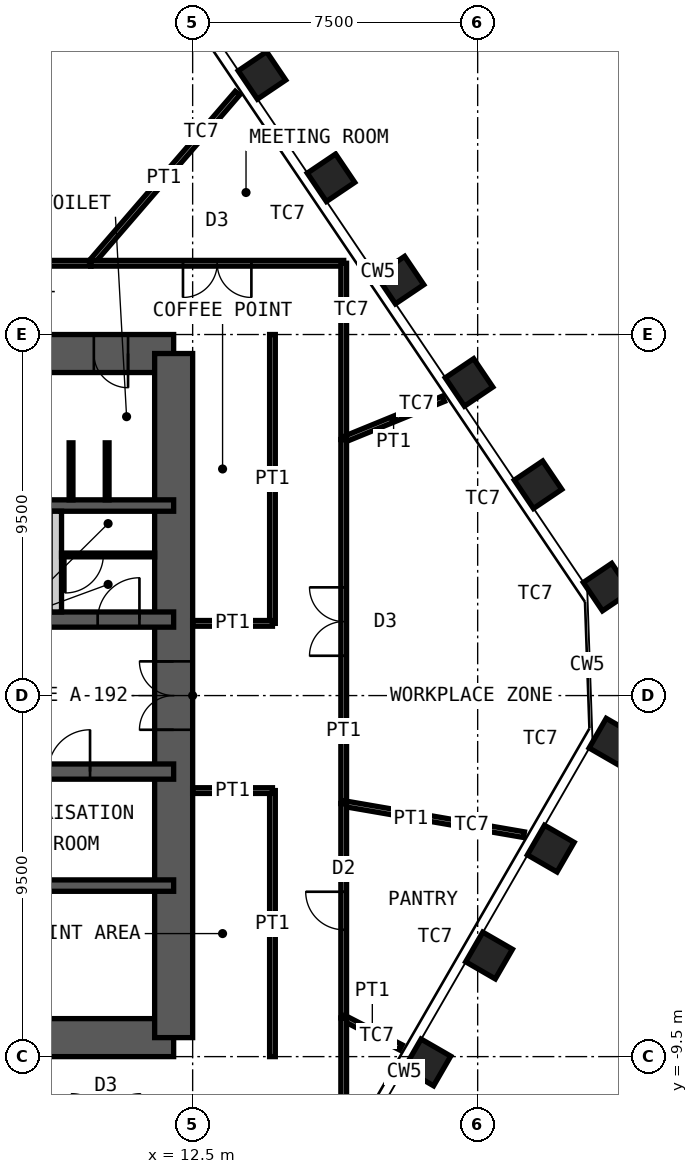
"""IFC4 building model, lengths in metres.
Left out: names, types, materials, properties, quantities, classifications, styles, units other than length and angle.
Written with IfcOpenShell. Run it as: python <this file> out.ifc"""

import sys

from ifc_helpers import new_model, si_unit, direction, frame, frame_2d, origin, origin_2d, place, context, subcontext, project, spatial, rectangle, hollow_rectangle, extrude, element, fill, save


model = new_model("IFC4")
c1 = context("Model", 3, precision=1e-05, world=origin(), true_north=direction((0.0, 1.0)))
c2 = subcontext(c1, "Body", "Model", "MODEL_VIEW")
j1 = project(units=[si_unit("LENGTHUNIT", "METRE"), si_unit("PLANEANGLEUNIT", "RADIAN")], contexts=[c1])
p1 = place(None, origin())
s1 = spatial("IfcSite", under=j1, at=p1, CompositionType="ELEMENT")
p2 = place(p1, origin())
s2 = spatial("IfcBuilding", under=s1, at=p2, CompositionType="ELEMENT")
p3 = place(p2, frame((0.0, 0.0, 274.6)))
s3 = spatial("IfcBuildingStorey", under=s2, at=p3, CompositionType="ELEMENT", Elevation=274.6)
for number, where, z_axis, x_axis in (
    (1, (14.324, 16.318, 0.0), (0.0, 0.0, 1.0), (-0.559, 0.829, 0.0)),
    (2, (16.141, 13.625, 0.0), (0.0, 0.0, 1.0), (-0.559, 0.829, 0.0)),
    (3, (17.957, 10.932, 0.0), (0.0, 0.0, 1.0), (-0.559, 0.829, 0.0)),
    (4, (19.773, 8.239, 0.0), (0.0, 0.0, 1.0), (-0.559, 0.829, 0.0)),
    (5, (21.589, 5.547, 0.0), (0.0, 0.0, 1.0), (-0.559, 0.829, 0.0)),
    (6, (23.406, 2.854, 0.0), (0.0, 0.0, 1.0), (-0.559, 0.829, 0.0)),
    (7, (23.548, -1.214, 0.0), (0.0, 0.0, 1.0), (0.5, 0.866, 0.0)),
    (8, (21.924, -4.027, 0.0), (0.0, 0.0, 1.0), (0.5, 0.866, 0.0)),
    (9, (20.3, -6.84, 0.0), (0.0, 0.0, 1.0), (0.5, 0.866, 0.0)),
    (10, (18.676, -9.653, 0.0), (0.0, 0.0, 1.0), (0.5, 0.866, 0.0)),
):
    element("IfcColumn", number, at=place(p3, frame(where, z_axis=z_axis, x_axis=x_axis)), inside=s3, PredefinedType="COLUMN", context=c2, shape_type="SweptSolid", body=[
        extrude(hollow_rectangle(XDim=0.9, YDim=0.9, WallThickness=0.06, at=origin_2d()), origin(), (0.0, 0.0, 1.0), 4.2),
    ])
p4 = place(p3, frame((-12.0, 9.0, 0.0), z_axis=(0.0, 0.0, 1.0), x_axis=(1.0, 0.0, 0.0)))
e11 = element("IfcWall", 11, at=p4, inside=s3, PredefinedType="SHEAR", context=c2, shape_type="SweptSolid", body=[
    extrude(rectangle(XDim=24.0, YDim=1.0, at=frame_2d((12.0, 0.0))), origin(), (0.0, 0.0, 1.0), 4.2),
])
p5 = place(p4, frame((10.4, 0.0, 0.0)))
e12 = element("IfcOpeningElement", 12, at=p5, cuts=e11, PredefinedType="OPENING", context=c2, shape_type="SweptSolid", body=[
    extrude(rectangle(XDim=1.0, YDim=2.1, at=frame_2d((0.5, 1.05))), frame((0.0, 0.51, 0.0), z_axis=(0.0, -1.0, 0.0), x_axis=(1.0, 0.0, 0.0)), (0.0, 0.0, 1.0), 1.02),
])
p6 = place(p4, frame((17.6, 0.0, 0.0)))
e13 = element("IfcOpeningElement", 13, at=p6, cuts=e11, PredefinedType="OPENING", context=c2, shape_type="SweptSolid", body=[
    extrude(rectangle(XDim=0.9, YDim=2.1, at=frame_2d((0.45, 1.05))), frame((0.0, 0.51, 0.0), z_axis=(0.0, -1.0, 0.0), x_axis=(1.0, 0.0, 0.0)), (0.0, 0.0, 1.0), 1.02),
])
p7 = place(p4, frame((21.9, 0.0, 0.0)))
e14 = element("IfcOpeningElement", 14, at=p7, cuts=e11, PredefinedType="OPENING", context=c2, shape_type="SweptSolid", body=[
    extrude(rectangle(XDim=0.9, YDim=2.1, at=frame_2d((0.45, 1.05))), frame((0.0, 0.51, 0.0), z_axis=(0.0, -1.0, 0.0), x_axis=(1.0, 0.0, 0.0)), (0.0, 0.0, 1.0), 1.02),
])
p8 = place(p3, frame((-12.0, -9.0, 0.0), z_axis=(0.0, 0.0, 1.0), x_axis=(1.0, 0.0, 0.0)))
e15 = element("IfcWall", 15, at=p8, inside=s3, PredefinedType="SHEAR", context=c2, shape_type="SweptSolid", body=[
    extrude(rectangle(XDim=24.0, YDim=1.0, at=frame_2d((12.0, 0.0))), origin(), (0.0, 0.0, 1.0), 4.2),
])
p9 = place(p8, frame((1.35, 0.0, 0.0)))
e16 = element("IfcOpeningElement", 16, at=p9, cuts=e15, PredefinedType="OPENING", context=c2, shape_type="SweptSolid", body=[
    extrude(rectangle(XDim=1.0, YDim=2.1, at=frame_2d((0.5, 1.05))), frame((0.0, 0.51, 0.0), z_axis=(0.0, -1.0, 0.0), x_axis=(1.0, 0.0, 0.0)), (0.0, 0.0, 1.0), 1.02),
])
p10 = place(p8, frame((5.325, 0.0, 0.0)))
e17 = element("IfcOpeningElement", 17, at=p10, cuts=e15, PredefinedType="OPENING", context=c2, shape_type="SweptSolid", body=[
    extrude(rectangle(XDim=1.15, YDim=2.1, at=frame_2d((0.575, 1.05))), frame((0.0, 0.51, 0.0), z_axis=(0.0, -1.0, 0.0), x_axis=(1.0, 0.0, 0.0)), (0.0, 0.0, 1.0), 1.02),
])
p11 = place(p8, frame((12.6, 0.0, 0.0)))
e18 = element("IfcOpeningElement", 18, at=p11, cuts=e15, PredefinedType="OPENING", context=c2, shape_type="SweptSolid", body=[
    extrude(rectangle(XDim=1.0, YDim=2.1, at=frame_2d((0.5, 1.05))), frame((0.0, 0.51, 0.0), z_axis=(0.0, -1.0, 0.0), x_axis=(1.0, 0.0, 0.0)), (0.0, 0.0, 1.0), 1.02),
])
p12 = place(p3, frame((12.0, -9.0, 0.0), z_axis=(0.0, 0.0, 1.0), x_axis=(0.0, 1.0, 0.0)))
e19 = element("IfcWall", 19, at=p12, inside=s3, PredefinedType="SHEAR", context=c2, shape_type="SweptSolid", body=[
    extrude(rectangle(XDim=18.0, YDim=1.0, at=frame_2d((9.0, 0.0))), origin(), (0.0, 0.0, 1.0), 4.2),
])
p13 = place(p12, frame((8.1, 0.0, 0.0)))
e20 = element("IfcOpeningElement", 20, at=p13, cuts=e19, PredefinedType="OPENING", context=c2, shape_type="SweptSolid", body=[
    extrude(rectangle(XDim=1.8, YDim=2.1, at=frame_2d((0.9, 1.05))), frame((0.0, 0.51, 0.0), z_axis=(0.0, -1.0, 0.0), x_axis=(1.0, 0.0, 0.0)), (0.0, 0.0, 1.0), 1.02),
])
p14 = place(p3, frame((-12.0, 5.0, 0.0), z_axis=(0.0, 0.0, 1.0), x_axis=(1.0, 0.0, 0.0)))
e21 = element("IfcWall", 21, at=p14, inside=s3, PredefinedType="SHEAR", context=c2, shape_type="SweptSolid", body=[
    extrude(rectangle(XDim=24.0, YDim=0.3, at=frame_2d((12.0, 0.0))), origin(), (0.0, 0.0, 1.0), 4.2),
])
p15 = place(p3, frame((-12.0, 2.0, 0.0), z_axis=(0.0, 0.0, 1.0), x_axis=(1.0, 0.0, 0.0)))
e22 = element("IfcWall", 22, at=p15, inside=s3, PredefinedType="SHEAR", context=c2, shape_type="SweptSolid", body=[
    extrude(rectangle(XDim=24.0, YDim=0.4, at=frame_2d((12.0, 0.0))), origin(), (0.0, 0.0, 1.0), 4.2),
])
p16 = place(p15, frame((2.4, 0.0, 0.0)))
e23 = element("IfcOpeningElement", 23, at=p16, cuts=e22, PredefinedType="OPENING", context=c2, shape_type="SweptSolid", body=[
    extrude(rectangle(XDim=1.1, YDim=2.1, at=frame_2d((0.55, 1.05))), frame((0.0, 0.21, 0.0), z_axis=(0.0, -1.0, 0.0), x_axis=(1.0, 0.0, 0.0)), (0.0, 0.0, 1.0), 0.42),
])
p17 = place(p15, frame((22.0, 0.0, 0.0)))
e24 = element("IfcOpeningElement", 24, at=p17, cuts=e22, PredefinedType="OPENING", context=c2, shape_type="SweptSolid", body=[
    extrude(rectangle(XDim=1.1, YDim=2.1, at=frame_2d((0.55, 1.05))), frame((0.0, 0.21, 0.0), z_axis=(0.0, -1.0, 0.0), x_axis=(1.0, 0.0, 0.0)), (0.0, 0.0, 1.0), 0.42),
])
p18 = place(p15, frame((10.15, 0.0, 0.0)))
e25 = element("IfcOpeningElement", 25, at=p18, cuts=e22, PredefinedType="OPENING", context=c2, shape_type="SweptSolid", body=[
    extrude(rectangle(XDim=1.0, YDim=2.1, at=frame_2d((0.5, 1.05))), frame((0.0, 0.21, 0.0), z_axis=(0.0, -1.0, 0.0), x_axis=(1.0, 0.0, 0.0)), (0.0, 0.0, 1.0), 0.42),
])
p19 = place(p15, frame((6.9, 0.0, 0.0)))
e26 = element("IfcOpeningElement", 26, at=p19, cuts=e22, PredefinedType="OPENING", context=c2, shape_type="SweptSolid", body=[
    extrude(rectangle(XDim=1.0, YDim=2.1, at=frame_2d((0.5, 1.05))), frame((0.0, 0.21, 0.0), z_axis=(0.0, -1.0, 0.0), x_axis=(1.0, 0.0, 0.0)), (0.0, 0.0, 1.0), 0.42),
])
p20 = place(p15, frame((13.35, 0.0, 0.0)))
e27 = element("IfcOpeningElement", 27, at=p20, cuts=e22, PredefinedType="OPENING", context=c2, shape_type="SweptSolid", body=[
    extrude(rectangle(XDim=1.1, YDim=2.4, at=frame_2d((0.55, 1.2))), frame((0.0, 0.21, 0.0), z_axis=(0.0, -1.0, 0.0), x_axis=(1.0, 0.0, 0.0)), (0.0, 0.0, 1.0), 0.42),
])
p21 = place(p15, frame((16.15, 0.0, 0.0)))
e28 = element("IfcOpeningElement", 28, at=p21, cuts=e22, PredefinedType="OPENING", context=c2, shape_type="SweptSolid", body=[
    extrude(rectangle(XDim=1.1, YDim=2.4, at=frame_2d((0.55, 1.2))), frame((0.0, 0.21, 0.0), z_axis=(0.0, -1.0, 0.0), x_axis=(1.0, 0.0, 0.0)), (0.0, 0.0, 1.0), 0.42),
])
p22 = place(p15, frame((19.0, 0.0, 0.0)))
e29 = element("IfcOpeningElement", 29, at=p22, cuts=e22, PredefinedType="OPENING", context=c2, shape_type="SweptSolid", body=[
    extrude(rectangle(XDim=1.0, YDim=2.1, at=frame_2d((0.5, 1.05))), frame((0.0, 0.21, 0.0), z_axis=(0.0, -1.0, 0.0), x_axis=(1.0, 0.0, 0.0)), (0.0, 0.0, 1.0), 0.42),
])
p23 = place(p3, frame((-12.0, -2.0, 0.0), z_axis=(0.0, 0.0, 1.0), x_axis=(1.0, 0.0, 0.0)))
e30 = element("IfcWall", 30, at=p23, inside=s3, PredefinedType="SHEAR", context=c2, shape_type="SweptSolid", body=[
    extrude(rectangle(XDim=24.0, YDim=0.4, at=frame_2d((12.0, 0.0))), origin(), (0.0, 0.0, 1.0), 4.2),
])
p24 = place(p23, frame((1.1, 0.0, 0.0)))
e31 = element("IfcOpeningElement", 31, at=p24, cuts=e30, PredefinedType="OPENING", context=c2, shape_type="SweptSolid", body=[
    extrude(rectangle(XDim=1.1, YDim=2.1, at=frame_2d((0.55, 1.05))), frame((0.0, 0.21, 0.0), z_axis=(0.0, -1.0, 0.0), x_axis=(1.0, 0.0, 0.0)), (0.0, 0.0, 1.0), 0.42),
])
p25 = place(p23, frame((13.55, 0.0, 0.0)))
e32 = element("IfcOpeningElement", 32, at=p25, cuts=e30, PredefinedType="OPENING", context=c2, shape_type="SweptSolid", body=[
    extrude(rectangle(XDim=1.1, YDim=2.1, at=frame_2d((0.55, 1.05))), frame((0.0, 0.21, 0.0), z_axis=(0.0, -1.0, 0.0), x_axis=(1.0, 0.0, 0.0)), (0.0, 0.0, 1.0), 0.42),
])
p26 = place(p23, frame((20.7, 0.0, 0.0)))
e33 = element("IfcOpeningElement", 33, at=p26, cuts=e30, PredefinedType="OPENING", context=c2, shape_type="SweptSolid", body=[
    extrude(rectangle(XDim=1.1, YDim=2.1, at=frame_2d((0.55, 1.05))), frame((0.0, 0.21, 0.0), z_axis=(0.0, -1.0, 0.0), x_axis=(1.0, 0.0, 0.0)), (0.0, 0.0, 1.0), 0.42),
])
p27 = place(p23, frame((4.0, 0.0, 0.0)))
e34 = element("IfcOpeningElement", 34, at=p27, cuts=e30, PredefinedType="OPENING", context=c2, shape_type="SweptSolid", body=[
    extrude(rectangle(XDim=1.0, YDim=2.1, at=frame_2d((0.5, 1.05))), frame((0.0, 0.21, 0.0), z_axis=(0.0, -1.0, 0.0), x_axis=(1.0, 0.0, 0.0)), (0.0, 0.0, 1.0), 0.42),
])
p28 = place(p23, frame((6.8, 0.0, 0.0)))
e35 = element("IfcOpeningElement", 35, at=p28, cuts=e30, PredefinedType="OPENING", context=c2, shape_type="SweptSolid", body=[
    extrude(rectangle(XDim=1.0, YDim=2.1, at=frame_2d((0.5, 1.05))), frame((0.0, 0.21, 0.0), z_axis=(0.0, -1.0, 0.0), x_axis=(1.0, 0.0, 0.0)), (0.0, 0.0, 1.0), 0.42),
])
p29 = place(p23, frame((9.6, 0.0, 0.0)))
e36 = element("IfcOpeningElement", 36, at=p29, cuts=e30, PredefinedType="OPENING", context=c2, shape_type="SweptSolid", body=[
    extrude(rectangle(XDim=1.0, YDim=2.1, at=frame_2d((0.5, 1.05))), frame((0.0, 0.21, 0.0), z_axis=(0.0, -1.0, 0.0), x_axis=(1.0, 0.0, 0.0)), (0.0, 0.0, 1.0), 0.42),
])
p30 = place(p3, frame((-12.0, -5.0, 0.0), z_axis=(0.0, 0.0, 1.0), x_axis=(1.0, 0.0, 0.0)))
e37 = element("IfcWall", 37, at=p30, inside=s3, PredefinedType="SHEAR", context=c2, shape_type="SweptSolid", body=[
    extrude(rectangle(XDim=24.0, YDim=0.3, at=frame_2d((12.0, 0.0))), origin(), (0.0, 0.0, 1.0), 4.2),
])
p31 = place(p3, frame((8.9, 2.2, 0.0), z_axis=(0.0, 0.0, 1.0), x_axis=(0.0, 1.0, 0.0)))
e38 = element("IfcWall", 38, at=p31, inside=s3, PredefinedType="PARTITIONING", context=c2, shape_type="SweptSolid", body=[
    extrude(rectangle(XDim=2.65, YDim=0.3, at=frame_2d((1.325, 0.0))), origin(), (0.0, 0.0, 1.0), 3.98),
])
p32 = place(p3, frame((9.05, 3.7, 0.0), z_axis=(0.0, 0.0, 1.0), x_axis=(1.0, 0.0, 0.0)))
e39 = element("IfcWall", 39, at=p32, inside=s3, PredefinedType="PARTITIONING", context=c2, shape_type="SweptSolid", body=[
    extrude(rectangle(XDim=2.45, YDim=0.1, at=frame_2d((1.225, 0.0))), origin(), (0.0, 0.0, 1.0), 3.98),
])
p33 = place(p32, frame((0.1, 0.0, 0.0)))
e40 = element("IfcOpeningElement", 40, at=p33, cuts=e39, PredefinedType="OPENING", context=c2, shape_type="SweptSolid", body=[
    extrude(rectangle(XDim=1.0, YDim=2.4, at=frame_2d((0.5, 1.2))), frame((0.0, 0.06, 0.0), z_axis=(0.0, -1.0, 0.0), x_axis=(1.0, 0.0, 0.0)), (0.0, 0.0, 1.0), 0.12),
])
for number, where, z_axis, x_axis in (
    (41, (9.3, 5.15, 0.0), (0.0, 0.0, 1.0), (0.0, 1.0, 0.0)),
    (42, (10.25, 5.15, 0.0), (0.0, 0.0, 1.0), (0.0, 1.0, 0.0)),
):
    element("IfcWall", number, at=place(p3, frame(where, z_axis=z_axis, x_axis=x_axis)), inside=s3, PredefinedType="PARTITIONING", context=c2, shape_type="SweptSolid", body=[
        extrude(rectangle(XDim=1.5, YDim=0.1, at=frame_2d((0.75, 0.0))), origin(), (0.0, 0.0, 1.0), 2.1),
    ])
p34 = place(p3, frame((-0.548, 11.375, 0.0), z_axis=(0.0, 0.0, 1.0), x_axis=(1.0, 0.0, 0.0)))
e43 = element("IfcWall", 43, at=p34, inside=s3, PredefinedType="PARTITIONING", context=c2, shape_type="SweptSolid", body=[
    extrude(rectangle(XDim=10.365, YDim=0.15, at=frame_2d((5.182, 0.0))), origin(), (0.0, 0.0, 1.0), 4.03),
])
p35 = place(p34, frame((4.282, 0.0, 0.0)))
e44 = element("IfcOpeningElement", 44, at=p35, cuts=e43, PredefinedType="OPENING", context=c2, shape_type="SweptSolid", body=[
    extrude(rectangle(XDim=1.8, YDim=2.4, at=frame_2d((0.9, 1.2))), frame((0.0, 0.085, 0.0), z_axis=(0.0, -1.0, 0.0), x_axis=(1.0, 0.0, 0.0)), (0.0, 0.0, 1.0), 0.17),
])
p36 = place(p3, frame((13.678, 15.85, 0.0), z_axis=(0.0, 0.0, 1.0), x_axis=(-0.653328423077, -0.757074614288, 0.0)))
e45 = element("IfcWall", 45, at=p36, inside=s3, PredefinedType="PARTITIONING", context=c2, shape_type="SweptSolid", body=[
    extrude(rectangle(XDim=5.911, YDim=0.15, at=frame_2d((2.956, 0.0))), origin(), (0.0, 0.0, 1.0), 3.33),
])
p37 = place(p3, frame((9.816, 11.375, 0.0), z_axis=(0.0, 0.0, 1.0), x_axis=(1.0, 0.0, 0.0)))
e46 = element("IfcWall", 46, at=p37, inside=s3, PredefinedType="PARTITIONING", context=c2, shape_type="SweptSolid", body=[
    extrude(rectangle(XDim=6.659, YDim=0.15, at=frame_2d((3.329, 0.0))), origin(), (0.0, 0.0, 1.0), 4.03),
])
p38 = place(p37, frame((2.429, 0.0, 0.0)))
e47 = element("IfcOpeningElement", 47, at=p38, cuts=e46, PredefinedType="OPENING", context=c2, shape_type="SweptSolid", body=[
    extrude(rectangle(XDim=1.8, YDim=2.4, at=frame_2d((0.9, 1.2))), frame((0.0, 0.085, 0.0), z_axis=(0.0, -1.0, 0.0), x_axis=(1.0, 0.0, 0.0)), (0.0, 0.0, 1.0), 0.17),
])
p39 = place(p3, frame((16.475, 11.375, 0.0), z_axis=(0.0, 0.0, 1.0), x_axis=(0.0, -1.0, 0.0)))
e48 = element("IfcWall", 48, at=p39, inside=s3, PredefinedType="PARTITIONING", context=c2, shape_type="SweptSolid", body=[
    extrude(rectangle(XDim=4.638, YDim=0.15, at=frame_2d((2.319, 0.0))), origin(), (0.0, 0.0, 1.0), 4.03),
])
p40 = place(p3, frame((19.1, 7.81, 0.0), z_axis=(0.0, 0.0, 1.0), x_axis=(-0.925593572601, -0.378518874509, 0.0)))
e49 = element("IfcWall", 49, at=p40, inside=s3, PredefinedType="PARTITIONING", context=c2, shape_type="SweptSolid", body=[
    extrude(rectangle(XDim=2.836, YDim=0.15, at=frame_2d((1.418, 0.0))), origin(), (0.0, 0.0, 1.0), 3.33),
])
p41 = place(p3, frame((16.475, 6.737, 0.0), z_axis=(0.0, 0.0, 1.0), x_axis=(0.0, -1.0, 0.0)))
e50 = element("IfcWall", 50, at=p41, inside=s3, PredefinedType="PARTITIONING", context=c2, shape_type="SweptSolid", body=[
    extrude(rectangle(XDim=9.578, YDim=0.15, at=frame_2d((4.789, 0.0))), origin(), (0.0, 0.0, 1.0), 4.03),
])
p42 = place(p41, frame((3.889, 0.0, 0.0)))
e51 = element("IfcOpeningElement", 51, at=p42, cuts=e50, PredefinedType="OPENING", context=c2, shape_type="SweptSolid", body=[
    extrude(rectangle(XDim=1.8, YDim=2.4, at=frame_2d((0.9, 1.2))), frame((0.0, 0.085, 0.0), z_axis=(0.0, -1.0, 0.0), x_axis=(1.0, 0.0, 0.0)), (0.0, 0.0, 1.0), 0.17),
])
p43 = place(p3, frame((21.219, -3.66, 0.0), z_axis=(0.0, 0.0, 1.0), x_axis=(-0.985444592587, 0.16999692627, 0.0)))
e52 = element("IfcWall", 52, at=p43, inside=s3, PredefinedType="PARTITIONING", context=c2, shape_type="SweptSolid", body=[
    extrude(rectangle(XDim=4.814, YDim=0.15, at=frame_2d((2.407, 0.0))), origin(), (0.0, 0.0, 1.0), 4.03),
])
p44 = place(p3, frame((16.475, -2.842, 0.0), z_axis=(0.0, 0.0, 1.0), x_axis=(0.0, -1.0, 0.0)))
e53 = element("IfcWall", 53, at=p44, inside=s3, PredefinedType="PARTITIONING", context=c2, shape_type="SweptSolid", body=[
    extrude(rectangle(XDim=5.64, YDim=0.15, at=frame_2d((2.82, 0.0))), origin(), (0.0, 0.0, 1.0), 4.03),
])
p45 = place(p44, frame((2.32, 0.0, 0.0)))
e54 = element("IfcOpeningElement", 54, at=p45, cuts=e53, PredefinedType="OPENING", context=c2, shape_type="SweptSolid", body=[
    extrude(rectangle(XDim=1.0, YDim=2.4, at=frame_2d((0.5, 1.2))), frame((0.0, 0.085, 0.0), z_axis=(0.0, -1.0, 0.0), x_axis=(1.0, 0.0, 0.0)), (0.0, 0.0, 1.0), 0.17),
])
p46 = place(p3, frame((17.98, -9.257, 0.0), z_axis=(0.0, 0.0, 1.0), x_axis=(-0.889058145064, 0.457794292991, 0.0)))
e55 = element("IfcWall", 55, at=p46, inside=s3, PredefinedType="PARTITIONING", context=c2, shape_type="SweptSolid", body=[
    extrude(rectangle(XDim=1.693, YDim=0.15, at=frame_2d((0.847, 0.0))), origin(), (0.0, 0.0, 1.0), 3.33),
])
p47 = place(p3, frame((16.475, -8.482, 0.0), z_axis=(0.0, 0.0, 1.0), x_axis=(0.0, -1.0, 0.0)))
e56 = element("IfcWall", 56, at=p47, inside=s3, PredefinedType="PARTITIONING", context=c2, shape_type="SweptSolid", body=[
    extrude(rectangle(XDim=2.893, YDim=0.15, at=frame_2d((1.447, 0.0))), origin(), (0.0, 0.0, 1.0), 4.03),
])
p48 = place(p3, frame((14.6, 1.9, 0.0), z_axis=(0.0, 0.0, 1.0), x_axis=(0.0, 1.0, 0.0)))
e57 = element("IfcWall", 57, at=p48, inside=s3, PredefinedType="PARTITIONING", context=c2, shape_type="SweptSolid", body=[
    extrude(rectangle(XDim=7.6, YDim=0.15, at=frame_2d((3.8, 0.0))), origin(), (0.0, 0.0, 1.0), 4.03),
])
p49 = place(p3, frame((12.5, 1.9, 0.0), z_axis=(0.0, 0.0, 1.0), x_axis=(1.0, 0.0, 0.0)))
e58 = element("IfcWall", 58, at=p49, inside=s3, PredefinedType="PARTITIONING", context=c2, shape_type="SweptSolid", body=[
    extrude(rectangle(XDim=2.1, YDim=0.15, at=frame_2d((1.05, 0.0))), origin(), (0.0, 0.0, 1.0), 2.93),
])
p50 = place(p3, frame((14.6, -9.5, 0.0), z_axis=(0.0, 0.0, 1.0), x_axis=(0.0, 1.0, 0.0)))
e59 = element("IfcWall", 59, at=p50, inside=s3, PredefinedType="PARTITIONING", context=c2, shape_type="SweptSolid", body=[
    extrude(rectangle(XDim=7.0, YDim=0.15, at=frame_2d((3.5, 0.0))), origin(), (0.0, 0.0, 1.0), 4.03),
])
p51 = place(p3, frame((12.5, -2.5, 0.0), z_axis=(0.0, 0.0, 1.0), x_axis=(1.0, 0.0, 0.0)))
e60 = element("IfcWall", 60, at=p51, inside=s3, PredefinedType="PARTITIONING", context=c2, shape_type="SweptSolid", body=[
    extrude(rectangle(XDim=2.1, YDim=0.15, at=frame_2d((1.05, 0.0))), origin(), (0.0, 0.0, 1.0), 3.33),
])
p52 = place(p7, origin())
e61 = element("IfcDoor", 61, at=p52, inside=s3, OperationType="SINGLE_SWING_RIGHT", PredefinedType="DOOR", context=c2, shape_type="SweptSolid", body=[
    extrude(rectangle(XDim=0.9, YDim=2.1, at=frame_2d((0.45, 1.05))), frame((0.0, 0.025, 0.0), z_axis=(0.0, -1.0, 0.0), x_axis=(1.0, 0.0, 0.0)), (0.0, 0.0, 1.0), 0.05),
])
fill(e14, e61)
p53 = place(p17, origin())
e62 = element("IfcDoor", 62, at=p53, inside=s3, OperationType="SINGLE_SWING_LEFT", PredefinedType="DOOR", context=c2, shape_type="SweptSolid", body=[
    extrude(rectangle(XDim=1.1, YDim=2.1, at=frame_2d((0.55, 1.05))), frame((0.0, 0.025, 0.0), z_axis=(0.0, -1.0, 0.0), x_axis=(1.0, 0.0, 0.0)), (0.0, 0.0, 1.0), 0.05),
])
fill(e24, e62)
p54 = place(p26, origin())
e63 = element("IfcDoor", 63, at=p54, inside=s3, OperationType="SINGLE_SWING_LEFT", PredefinedType="DOOR", context=c2, shape_type="SweptSolid", body=[
    extrude(rectangle(XDim=1.1, YDim=2.1, at=frame_2d((0.55, 1.05))), frame((0.0, 0.025, 0.0), z_axis=(0.0, -1.0, 0.0), x_axis=(1.0, 0.0, 0.0)), (0.0, 0.0, 1.0), 0.05),
])
fill(e33, e63)
p55 = place(p13, origin())
e64 = element("IfcDoor", 64, at=p55, inside=s3, OperationType="DOUBLE_DOOR_DOUBLE_SWING", PredefinedType="DOOR", context=c2, shape_type="SweptSolid", body=[
    extrude(rectangle(XDim=1.8, YDim=2.1, at=frame_2d((0.9, 1.05))), frame((0.0, 0.025, 0.0), z_axis=(0.0, -1.0, 0.0), x_axis=(1.0, 0.0, 0.0)), (0.0, 0.0, 1.0), 0.05),
])
fill(e20, e64)
p56 = place(p33, origin())
e65 = element("IfcDoor", 65, at=p56, inside=s3, OperationType="SINGLE_SWING_LEFT", PredefinedType="DOOR", context=c2, shape_type="SweptSolid", body=[
    extrude(rectangle(XDim=1.0, YDim=2.4, at=frame_2d((0.5, 1.2))), frame((0.0, 0.025, 0.0), z_axis=(0.0, -1.0, 0.0), x_axis=(1.0, 0.0, 0.0)), (0.0, 0.0, 1.0), 0.05),
])
fill(e40, e65)
p57 = place(p38, origin())
e66 = element("IfcDoor", 66, at=p57, inside=s3, OperationType="DOUBLE_DOOR_DOUBLE_SWING", PredefinedType="DOOR", context=c2, shape_type="SweptSolid", body=[
    extrude(rectangle(XDim=1.8, YDim=2.4, at=frame_2d((0.9, 1.2))), frame((0.0, 0.025, 0.0), z_axis=(0.0, -1.0, 0.0), x_axis=(1.0, 0.0, 0.0)), (0.0, 0.0, 1.0), 0.05),
])
fill(e47, e66)
p58 = place(p42, origin())
e67 = element("IfcDoor", 67, at=p58, inside=s3, OperationType="DOUBLE_DOOR_DOUBLE_SWING", PredefinedType="DOOR", context=c2, shape_type="SweptSolid", body=[
    extrude(rectangle(XDim=1.8, YDim=2.4, at=frame_2d((0.9, 1.2))), frame((0.0, 0.025, 0.0), z_axis=(0.0, -1.0, 0.0), x_axis=(1.0, 0.0, 0.0)), (0.0, 0.0, 1.0), 0.05),
])
fill(e51, e67)
p59 = place(p45, origin())
e68 = element("IfcDoor", 68, at=p59, inside=s3, OperationType="SINGLE_SWING_LEFT", PredefinedType="DOOR", context=c2, shape_type="SweptSolid", body=[
    extrude(rectangle(XDim=1.0, YDim=2.4, at=frame_2d((0.5, 1.2))), frame((0.0, 0.025, 0.0), z_axis=(0.0, -1.0, 0.0), x_axis=(1.0, 0.0, 0.0)), (0.0, 0.0, 1.0), 0.05),
])
fill(e54, e68)
save(model, sys.argv[1])
